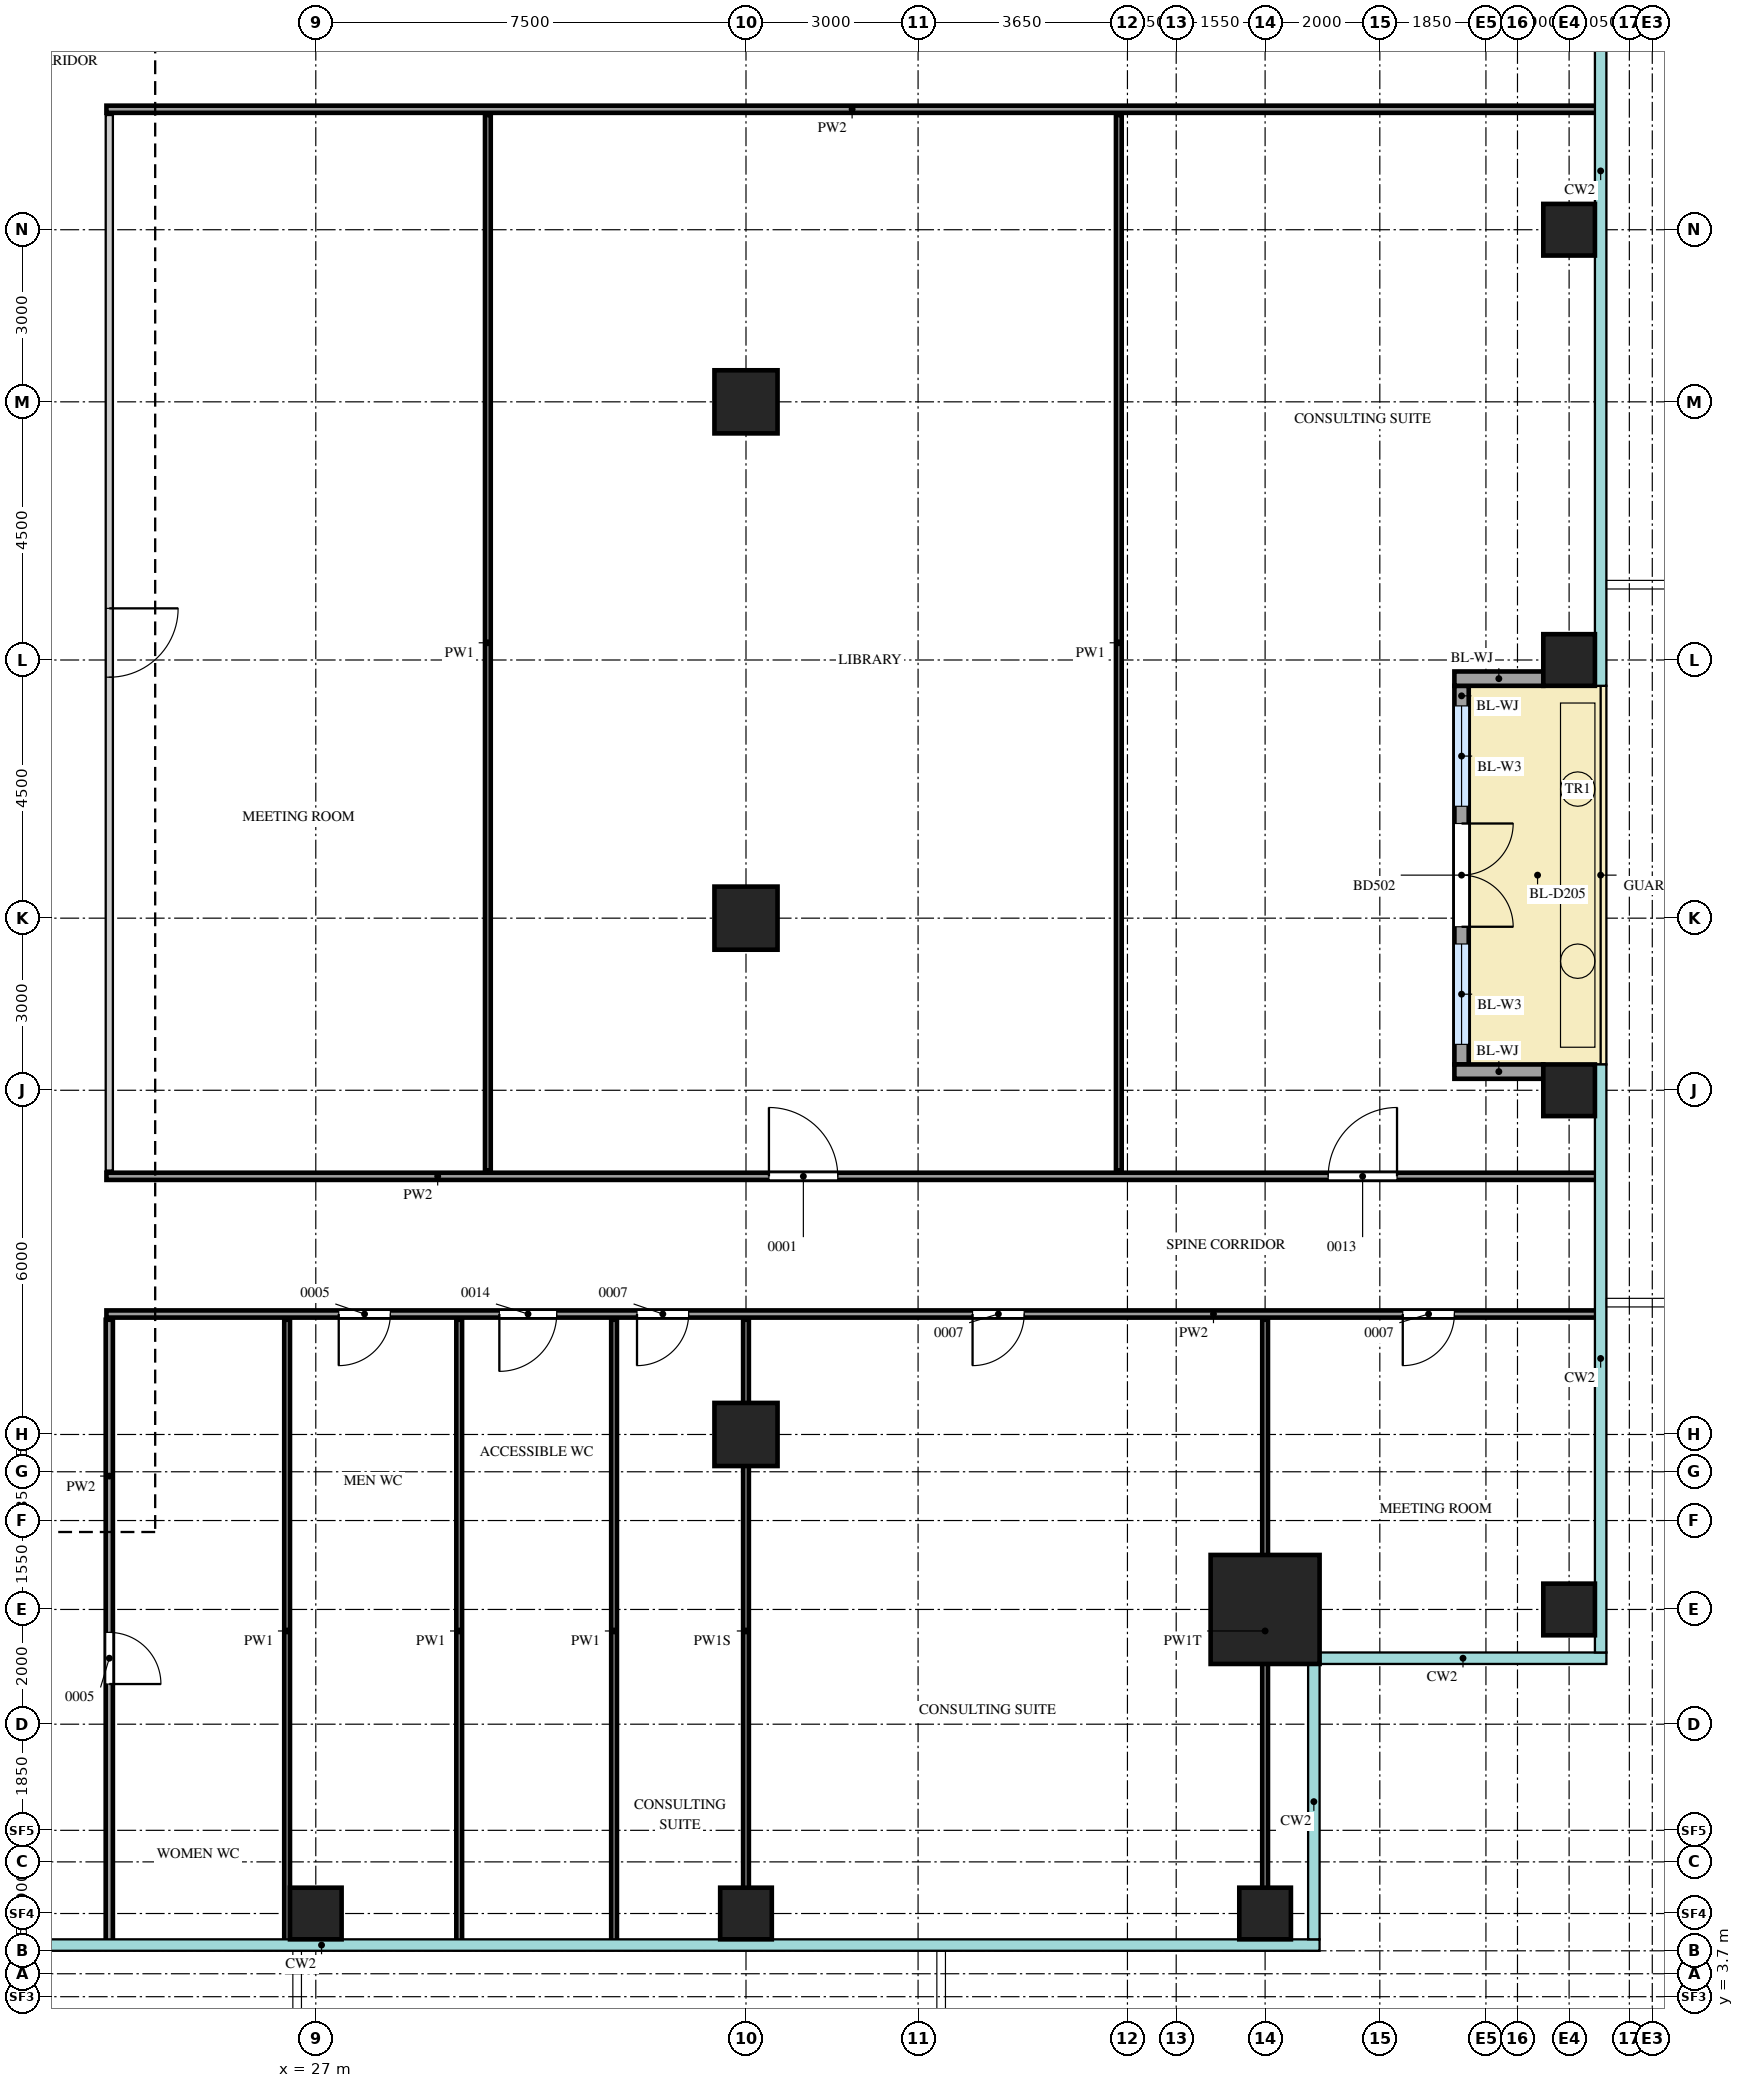
"""IFC4 building model, lengths in metres.
Left out: names, types, materials, properties, quantities, classifications, styles, units other than length and angle.
Written with IfcOpenShell. Run it as: python <this file> out.ifc"""

import sys

from ifc_helpers import new_model, si_unit, direction, frame, frame_2d, origin, origin_2d, place, context, subcontext, project, spatial, rectangle, extrude, source, transform, mapped, element, fill, save


model = new_model("IFC4")
c1 = context("Model", 3, precision=1e-05, world=origin(), true_north=direction((0.0, 1.0)))
c2 = subcontext(c1, "Body", "Model", "MODEL_VIEW")
j1 = project(units=[si_unit("LENGTHUNIT", "METRE"), si_unit("PLANEANGLEUNIT", "RADIAN")], contexts=[c1])
p1 = place(None, origin())
s1 = spatial("IfcSite", under=j1, at=p1, CompositionType="ELEMENT")
p2 = place(p1, origin())
s2 = spatial("IfcBuilding", under=s1, at=p2, CompositionType="ELEMENT")
p3 = place(p2, frame((0.0, 0.0, 226.2)))
s3 = spatial("IfcBuildingStorey", under=s2, at=p3, CompositionType="ELEMENT", Elevation=226.2)
m1 = source(origin(), c2, "Body", "SweptSolid", [
    extrude(rectangle(XDim=1.9, YDim=1.9, at=origin_2d()), origin(), (0.0, 0.0, 1.0), 4.0),
])
p4 = place(p3, frame((43.55, 10.45, 0.0), z_axis=(0.0, 0.0, 1.0), x_axis=(1.0, 0.0, 0.0)))
e1 = element("IfcColumn", 1, at=p4, inside=s3, PredefinedType="COLUMN", context=c2, shape_type="MappedRepresentation", body=[
    mapped(m1, transform((0.0, 0.0, 0.0))),
])
m2 = source(origin(), c2, "Body", "SweptSolid", [
    extrude(rectangle(XDim=0.9, YDim=0.9, at=origin_2d()), origin(), (0.0, 0.0, 1.0), 3.75),
])
for number, where, z_axis, x_axis in (
    (2, (27.0, 5.15, 0.0), (0.0, 0.0, 1.0), (1.0, 0.0, 0.0)),
    (3, (34.5, 5.15, 0.0), (0.0, 0.0, 1.0), (1.0, 0.0, 0.0)),
    (4, (43.55, 5.15, 0.0), (0.0, 0.0, 1.0), (1.0, 0.0, 0.0)),
    (5, (48.85, 10.45, 0.0), (0.0, 0.0, 1.0), (1.0, 0.0, 0.0)),
    (6, (48.85, 19.5, 0.0), (0.0, 0.0, 1.0), (1.0, 0.0, 0.0)),
    (7, (48.85, 27.0, 0.0), (0.0, 0.0, 1.0), (1.0, 0.0, 0.0)),
    (8, (48.85, 34.5, 0.0), (0.0, 0.0, 1.0), (1.0, 0.0, 0.0)),
):
    element("IfcColumn", number, at=place(p3, frame(where, z_axis=z_axis, x_axis=x_axis)), inside=s3, PredefinedType="COLUMN", context=c2, shape_type="MappedRepresentation", body=[
        mapped(m2, transform((0.0, 0.0, 0.0))),
    ])
m3 = source(origin(), c2, "Body", "SweptSolid", [
    extrude(rectangle(XDim=1.1, YDim=1.1, at=origin_2d()), origin(), (0.0, 0.0, 1.0), 3.75),
])
for number, where, z_axis, x_axis in (
    (9, (34.5, 13.5, 0.0), (0.0, 0.0, 1.0), (1.0, 0.0, 0.0)),
    (10, (34.5, 22.5, 0.0), (0.0, 0.0, 1.0), (1.0, 0.0, 0.0)),
    (11, (34.5, 31.5, 0.0), (0.0, 0.0, 1.0), (1.0, 0.0, 0.0)),
):
    element("IfcColumn", number, at=place(p3, frame(where, z_axis=z_axis, x_axis=x_axis)), inside=s3, PredefinedType="COLUMN", context=c2, shape_type="MappedRepresentation", body=[
        mapped(m3, transform((0.0, 0.0, 0.0))),
    ])
m4 = source(origin(), c2, "Body", "SweptSolid", [
    extrude(rectangle(XDim=6.6, YDim=0.25, at=frame_2d((3.3, 0.0))), origin(), (0.0, 0.0, 1.0), 3.2),
])
p5 = place(p3, frame((46.975, 19.95, 0.0), z_axis=(0.0, 0.0, 1.0), x_axis=(0.0, 1.0, 0.0)))
e12 = element("IfcWall", 12, at=p5, inside=s3, PredefinedType="SOLIDWALL", context=c2, shape_type="MappedRepresentation", body=[
    mapped(m4, transform((0.0, 0.0, 0.0))),
])
m5 = source(origin(), c2, "Body", "SweptSolid", [
    extrude(rectangle(XDim=1.75, YDim=2.4, at=frame_2d((0.875, 1.2))), frame((0.0, 0.135, 0.0), z_axis=(0.0, -1.0, 0.0), x_axis=(1.0, 0.0, 0.0)), (0.0, 0.0, 1.0), 0.27),
])
p6 = place(p5, frame((0.35, 0.0, 0.0)))
e13 = element("IfcOpeningElement", 13, at=p6, cuts=e12, PredefinedType="OPENING", context=c2, shape_type="MappedRepresentation", body=[
    mapped(m5, transform((0.0, 0.0, 0.0))),
])
p7 = place(p5, frame((4.5, 0.0, 0.0)))
e14 = element("IfcOpeningElement", 14, at=p7, cuts=e12, PredefinedType="OPENING", context=c2, shape_type="MappedRepresentation", body=[
    mapped(m5, transform((0.0, 0.0, 0.0))),
])
m6 = source(origin(), c2, "Body", "SweptSolid", [
    extrude(rectangle(XDim=1.8, YDim=2.4, at=frame_2d((0.9, 1.2))), frame((0.0, 0.135, 0.0), z_axis=(0.0, -1.0, 0.0), x_axis=(1.0, 0.0, 0.0)), (0.0, 0.0, 1.0), 0.27),
])
p8 = place(p5, frame((2.4, 0.0, 0.0)))
e15 = element("IfcOpeningElement", 15, at=p8, cuts=e12, PredefinedType="OPENING", context=c2, shape_type="MappedRepresentation", body=[
    mapped(m6, transform((0.0, 0.0, 0.0))),
])
m7 = source(origin(), c2, "Body", "SweptSolid", [
    extrude(rectangle(XDim=1.55, YDim=0.25, at=frame_2d((0.775, 0.0))), origin(), (0.0, 0.0, 1.0), 3.2),
])
for number, where, z_axis, x_axis in (
    (16, (48.4, 19.825, 0.0), (0.0, 0.0, 1.0), (-1.0, 0.0, 0.0)),
    (17, (48.4, 26.675, 0.0), (0.0, 0.0, 1.0), (-1.0, 0.0, 0.0)),
):
    element("IfcWall", number, at=place(p3, frame(where, z_axis=z_axis, x_axis=x_axis)), inside=s3, PredefinedType="SOLIDWALL", context=c2, shape_type="MappedRepresentation", body=[
        mapped(m7, transform((0.0, 0.0, 0.0))),
    ])
m8 = source(origin(), c2, "Body", "SweptSolid", [
    extrude(rectangle(XDim=10.85, YDim=0.125, at=frame_2d((5.425, 0.0))), origin(), (0.0, 0.0, 1.0), 3.8),
])
p9 = place(p3, frame((23.4, 4.65, 0.0), z_axis=(0.0, 0.0, 1.0), x_axis=(0.0, 1.0, 0.0)))
e18 = element("IfcWall", 18, at=p9, inside=s3, PredefinedType="PARTITIONING", context=c2, shape_type="MappedRepresentation", body=[
    mapped(m8, transform((0.0, 0.0, 0.0))),
])
m9 = source(origin(), c2, "Body", "SweptSolid", [
    extrude(rectangle(XDim=0.9, YDim=2.1, at=frame_2d((0.45, 1.05))), frame((0.0, 0.073, 0.0), z_axis=(0.0, -1.0, 0.0), x_axis=(1.0, 0.0, 0.0)), (0.0, 0.0, 1.0), 0.145),
])
p10 = place(p9, frame((4.5, 0.0, 0.0)))
e19 = element("IfcOpeningElement", 19, at=p10, cuts=e18, PredefinedType="OPENING", context=c2, shape_type="MappedRepresentation", body=[
    mapped(m9, transform((0.0, 0.0, 0.0))),
])
m10 = source(origin(), c2, "Body", "SweptSolid", [
    extrude(rectangle(XDim=10.85, YDim=0.1, at=frame_2d((5.425, 0.0))), origin(), (0.0, 0.0, 1.0), 3.8),
])
for number, where, z_axis, x_axis in (
    (20, (26.5, 4.65, 0.0), (0.0, 0.0, 1.0), (0.0, 1.0, 0.0)),
    (21, (29.5, 4.65, 0.0), (0.0, 0.0, 1.0), (0.0, 1.0, 0.0)),
    (22, (32.2, 4.65, 0.0), (0.0, 0.0, 1.0), (0.0, 1.0, 0.0)),
):
    element("IfcWall", number, at=place(p3, frame(where, z_axis=z_axis, x_axis=x_axis)), inside=s3, PredefinedType="PARTITIONING", context=c2, shape_type="MappedRepresentation", body=[
        mapped(m10, transform((0.0, 0.0, 0.0))),
    ])
m11 = source(origin(), c2, "Body", "SweptSolid", [
    extrude(rectangle(XDim=10.85, YDim=0.1, at=frame_2d((5.425, 0.0))), origin(), (0.0, 0.0, 1.0), 3.35),
])
p11 = place(p3, frame((34.5, 4.65, 0.0), z_axis=(0.0, 0.0, 1.0), x_axis=(0.0, 1.0, 0.0)))
e23 = element("IfcWall", 23, at=p11, inside=s3, PredefinedType="PARTITIONING", context=c2, shape_type="MappedRepresentation", body=[
    mapped(m11, transform((0.0, 0.0, 0.0))),
])
m12 = source(origin(), c2, "Body", "SweptSolid", [
    extrude(rectangle(XDim=10.85, YDim=0.1, at=frame_2d((5.425, 0.0))), origin(), (0.0, 0.0, 1.0), 3.3),
])
p12 = place(p3, frame((43.55, 4.65, 0.0), z_axis=(0.0, 0.0, 1.0), x_axis=(0.0, 1.0, 0.0)))
e24 = element("IfcWall", 24, at=p12, inside=s3, PredefinedType="PARTITIONING", context=c2, shape_type="MappedRepresentation", body=[
    mapped(m12, transform((0.0, 0.0, 0.0))),
])
m13 = source(origin(), c2, "Body", "SweptSolid", [
    extrude(rectangle(XDim=26.0, YDim=0.125, at=frame_2d((13.0, 0.0))), origin(), (0.0, 0.0, 1.0), 3.8),
])
p13 = place(p3, frame((23.35, 15.6, 0.0), z_axis=(0.0, 0.0, 1.0), x_axis=(1.0, 0.0, 0.0)))
e25 = element("IfcWall", 25, at=p13, inside=s3, PredefinedType="PARTITIONING", context=c2, shape_type="MappedRepresentation", body=[
    mapped(m13, transform((0.0, 0.0, 0.0))),
])
p14 = place(p13, frame((4.05, 0.0, 0.0)))
e26 = element("IfcOpeningElement", 26, at=p14, cuts=e25, PredefinedType="OPENING", context=c2, shape_type="MappedRepresentation", body=[
    mapped(m9, transform((0.0, 0.0, 0.0))),
])
m14 = source(origin(), c2, "Body", "SweptSolid", [
    extrude(rectangle(XDim=1.0, YDim=2.1, at=frame_2d((0.5, 1.05))), frame((0.0, 0.073, 0.0), z_axis=(0.0, -1.0, 0.0), x_axis=(1.0, 0.0, 0.0)), (0.0, 0.0, 1.0), 0.145),
])
p15 = place(p13, frame((6.85, 0.0, 0.0)))
e27 = element("IfcOpeningElement", 27, at=p15, cuts=e25, PredefinedType="OPENING", context=c2, shape_type="MappedRepresentation", body=[
    mapped(m14, transform((0.0, 0.0, 0.0))),
])
p16 = place(p13, frame((9.25, 0.0, 0.0)))
e28 = element("IfcOpeningElement", 28, at=p16, cuts=e25, PredefinedType="OPENING", context=c2, shape_type="MappedRepresentation", body=[
    mapped(m9, transform((0.0, 0.0, 0.0))),
])
p17 = place(p13, frame((15.1, 0.0, 0.0)))
e29 = element("IfcOpeningElement", 29, at=p17, cuts=e25, PredefinedType="OPENING", context=c2, shape_type="MappedRepresentation", body=[
    mapped(m9, transform((0.0, 0.0, 0.0))),
])
p18 = place(p13, frame((22.6, 0.0, 0.0)))
e30 = element("IfcOpeningElement", 30, at=p18, cuts=e25, PredefinedType="OPENING", context=c2, shape_type="MappedRepresentation", body=[
    mapped(m9, transform((0.0, 0.0, 0.0))),
])
p19 = place(p3, frame((23.35, 18.0, 0.0), z_axis=(0.0, 0.0, 1.0), x_axis=(1.0, 0.0, 0.0)))
e31 = element("IfcWall", 31, at=p19, inside=s3, PredefinedType="PARTITIONING", context=c2, shape_type="MappedRepresentation", body=[
    mapped(m13, transform((0.0, 0.0, 0.0))),
])
m15 = source(origin(), c2, "Body", "SweptSolid", [
    extrude(rectangle(XDim=1.2, YDim=2.1, at=frame_2d((0.6, 1.05))), frame((0.0, 0.073, 0.0), z_axis=(0.0, -1.0, 0.0), x_axis=(1.0, 0.0, 0.0)), (0.0, 0.0, 1.0), 0.145),
])
p20 = place(p19, frame((11.55, 0.0, 0.0)))
e32 = element("IfcOpeningElement", 32, at=p20, cuts=e31, PredefinedType="OPENING", context=c2, shape_type="MappedRepresentation", body=[
    mapped(m15, transform((0.0, 0.0, 0.0))),
])
p21 = place(p19, frame((21.3, 0.0, 0.0)))
e33 = element("IfcOpeningElement", 33, at=p21, cuts=e31, PredefinedType="OPENING", context=c2, shape_type="MappedRepresentation", body=[
    mapped(m15, transform((0.0, 0.0, 0.0))),
])
m16 = source(origin(), c2, "Body", "SweptSolid", [
    extrude(rectangle(XDim=18.4, YDim=0.125, at=frame_2d((9.2, 0.0))), origin(), (0.0, 0.0, 1.0), 3.8),
])
p22 = place(p3, frame((23.4, 18.1, 0.0), z_axis=(0.0, 0.0, 1.0), x_axis=(0.0, 1.0, 0.0)))
e34 = element("IfcWall", 34, at=p22, inside=s3, PredefinedType="PARTITIONING", context=c2, shape_type="MappedRepresentation", body=[
    mapped(m16, transform((0.0, 0.0, 0.0))),
])
p23 = place(p22, frame((8.6, 0.0, 0.0)))
e35 = element("IfcOpeningElement", 35, at=p23, cuts=e34, PredefinedType="OPENING", context=c2, shape_type="MappedRepresentation", body=[
    mapped(m15, transform((0.0, 0.0, 0.0))),
])
m17 = source(origin(), c2, "Body", "SweptSolid", [
    extrude(rectangle(XDim=18.4, YDim=0.1, at=frame_2d((9.2, 0.0))), origin(), (0.0, 0.0, 1.0), 3.8),
])
for number, where, z_axis, x_axis in (
    (36, (30.0, 18.1, 0.0), (0.0, 0.0, 1.0), (0.0, 1.0, 0.0)),
    (37, (41.0, 18.1, 0.0), (0.0, 0.0, 1.0), (0.0, 1.0, 0.0)),
):
    element("IfcWall", number, at=place(p3, frame(where, z_axis=z_axis, x_axis=x_axis)), inside=s3, PredefinedType="PARTITIONING", context=c2, shape_type="MappedRepresentation", body=[
        mapped(m17, transform((0.0, 0.0, 0.0))),
    ])
p24 = place(p3, frame((23.35, 36.6, 0.0), z_axis=(0.0, 0.0, 1.0), x_axis=(1.0, 0.0, 0.0)))
e38 = element("IfcWall", 38, at=p24, inside=s3, PredefinedType="PARTITIONING", context=c2, shape_type="MappedRepresentation", body=[
    mapped(m13, transform((0.0, 0.0, 0.0))),
])
m18 = source(origin(), c2, "Body", "SweptSolid", [
    extrude(rectangle(XDim=1.75, YDim=2.4, at=frame_2d((0.875, 1.2))), frame((0.0, 0.03, 0.0), z_axis=(0.0, -1.0, 0.0), x_axis=(1.0, 0.0, 0.0)), (0.0, 0.0, 1.0), 0.06),
])
p25 = place(p6, origin())
e39 = element("IfcWindow", 39, at=p25, inside=s3, PartitioningType="SINGLE_PANEL", PredefinedType="WINDOW", context=c2, shape_type="MappedRepresentation", body=[
    mapped(m18, transform((0.0, 0.0, 0.0))),
])
fill(e13, e39)
p26 = place(p7, origin())
e40 = element("IfcWindow", 40, at=p26, inside=s3, PartitioningType="SINGLE_PANEL", PredefinedType="WINDOW", context=c2, shape_type="MappedRepresentation", body=[
    mapped(m18, transform((0.0, 0.0, 0.0))),
])
fill(e14, e40)
m19 = source(origin(), c2, "Body", "SweptSolid", [
    extrude(rectangle(XDim=1.8, YDim=2.4, at=frame_2d((0.9, 1.2))), frame((0.0, 0.025, 0.0), z_axis=(0.0, -1.0, 0.0), x_axis=(1.0, 0.0, 0.0)), (0.0, 0.0, 1.0), 0.05),
])
p27 = place(p8, origin())
e41 = element("IfcDoor", 41, at=p27, inside=s3, OperationType="DOUBLE_DOOR_DOUBLE_SWING", PredefinedType="DOOR", context=c2, shape_type="MappedRepresentation", body=[
    mapped(m19, transform((0.0, 0.0, 0.0))),
])
fill(e15, e41)
m20 = source(origin(), c2, "Body", "SweptSolid", [
    extrude(rectangle(XDim=0.9, YDim=2.1, at=frame_2d((0.45, 1.05))), frame((0.0, 0.025, 0.0), z_axis=(0.0, -1.0, 0.0), x_axis=(1.0, 0.0, 0.0)), (0.0, 0.0, 1.0), 0.05),
])
p28 = place(p10, origin())
e42 = element("IfcDoor", 42, at=p28, inside=s3, OperationType="SINGLE_SWING_LEFT", PredefinedType="DOOR", context=c2, shape_type="MappedRepresentation", body=[
    mapped(m20, transform((0.0, 0.0, 0.0))),
])
fill(e19, e42)
p29 = place(p14, origin())
e43 = element("IfcDoor", 43, at=p29, inside=s3, OperationType="SINGLE_SWING_LEFT", PredefinedType="DOOR", context=c2, shape_type="MappedRepresentation", body=[
    mapped(m20, transform((0.0, 0.0, 0.0))),
])
fill(e26, e43)
m21 = source(origin(), c2, "Body", "SweptSolid", [
    extrude(rectangle(XDim=1.0, YDim=2.1, at=frame_2d((0.5, 1.05))), frame((0.0, 0.025, 0.0), z_axis=(0.0, -1.0, 0.0), x_axis=(1.0, 0.0, 0.0)), (0.0, 0.0, 1.0), 0.05),
])
p30 = place(p15, origin())
e44 = element("IfcDoor", 44, at=p30, inside=s3, OperationType="SINGLE_SWING_LEFT", PredefinedType="DOOR", context=c2, shape_type="MappedRepresentation", body=[
    mapped(m21, transform((0.0, 0.0, 0.0))),
])
fill(e27, e44)
p31 = place(p16, origin())
e45 = element("IfcDoor", 45, at=p31, inside=s3, OperationType="SINGLE_SWING_LEFT", PredefinedType="DOOR", context=c2, shape_type="MappedRepresentation", body=[
    mapped(m20, transform((0.0, 0.0, 0.0))),
])
fill(e28, e45)
p32 = place(p17, origin())
e46 = element("IfcDoor", 46, at=p32, inside=s3, OperationType="SINGLE_SWING_LEFT", PredefinedType="DOOR", context=c2, shape_type="MappedRepresentation", body=[
    mapped(m20, transform((0.0, 0.0, 0.0))),
])
fill(e29, e46)
p33 = place(p18, origin())
e47 = element("IfcDoor", 47, at=p33, inside=s3, OperationType="SINGLE_SWING_LEFT", PredefinedType="DOOR", context=c2, shape_type="MappedRepresentation", body=[
    mapped(m20, transform((0.0, 0.0, 0.0))),
])
fill(e30, e47)
m22 = source(origin(), c2, "Body", "SweptSolid", [
    extrude(rectangle(XDim=1.2, YDim=2.1, at=frame_2d((0.6, 1.05))), frame((0.0, 0.025, 0.0), z_axis=(0.0, -1.0, 0.0), x_axis=(1.0, 0.0, 0.0)), (0.0, 0.0, 1.0), 0.05),
])
p34 = place(p23, origin())
e48 = element("IfcDoor", 48, at=p34, inside=s3, OperationType="SINGLE_SWING_RIGHT", PredefinedType="DOOR", context=c2, shape_type="MappedRepresentation", body=[
    mapped(m22, transform((0.0, 0.0, 0.0))),
])
fill(e35, e48)
p35 = place(p20, origin())
e49 = element("IfcDoor", 49, at=p35, inside=s3, OperationType="SINGLE_SWING_RIGHT", PredefinedType="DOOR", context=c2, shape_type="MappedRepresentation", body=[
    mapped(m22, transform((0.0, 0.0, 0.0))),
])
fill(e32, e49)
p36 = place(p21, origin())
e50 = element("IfcDoor", 50, at=p36, inside=s3, OperationType="SINGLE_SWING_LEFT", PredefinedType="DOOR", context=c2, shape_type="MappedRepresentation", body=[
    mapped(m22, transform((0.0, 0.0, 0.0))),
])
fill(e33, e50)
save(model, sys.argv[1])
